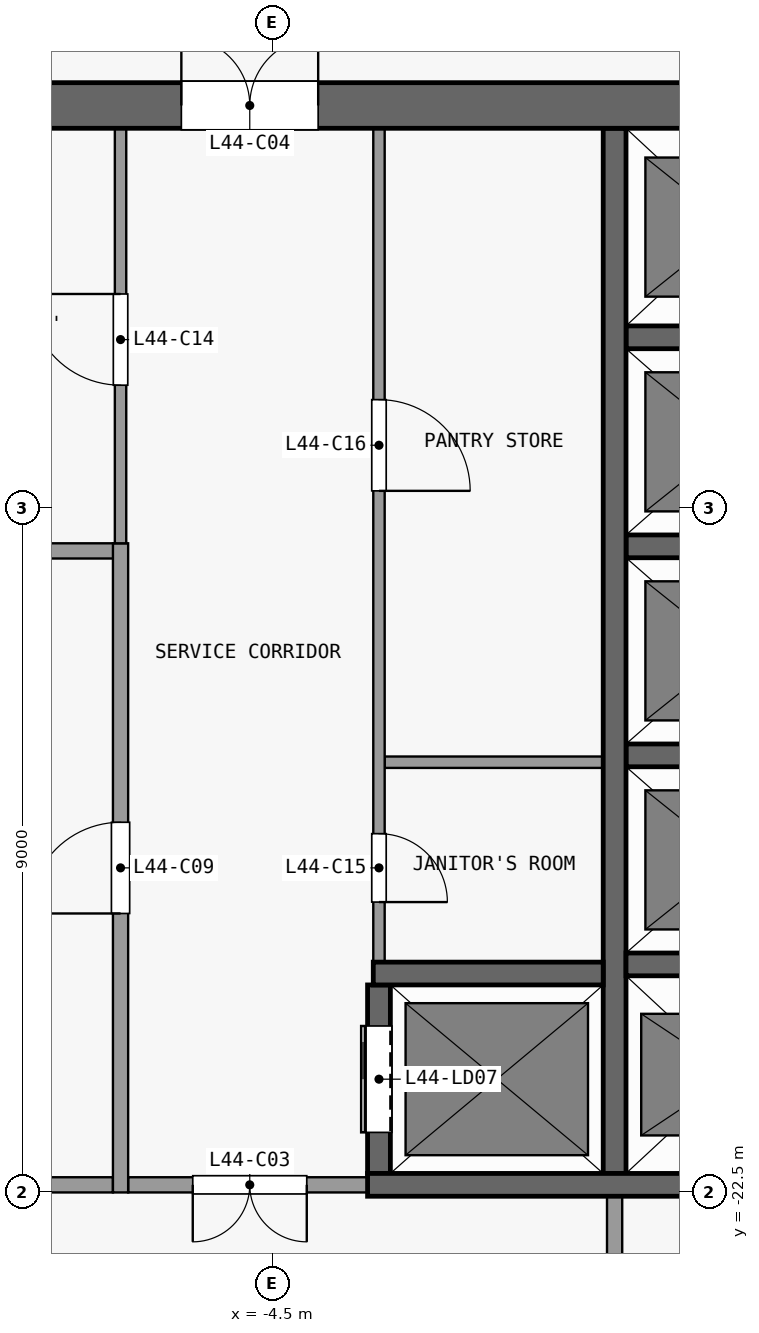
"""IFC4 building model, lengths in metres.
Left out: names, types, materials, properties, quantities, classifications, styles, units other than length and angle.
Written with IfcOpenShell. Run it as: python <this file> out.ifc"""

import sys

from ifc_helpers import new_model, si_unit, direction, frame, frame_2d, origin, place, context, subcontext, project, spatial, rectangle, extrude, element, fill, save


model = new_model("IFC4")
c1 = context("Model", 3, precision=1e-05, world=origin(), true_north=direction((0.0, 1.0)))
c2 = subcontext(c1, "Body", "Model", "MODEL_VIEW")
j1 = project(units=[si_unit("LENGTHUNIT", "METRE"), si_unit("PLANEANGLEUNIT", "RADIAN")], contexts=[c1])
p1 = place(None, origin())
s1 = spatial("IfcSite", under=j1, at=p1, CompositionType="ELEMENT")
p2 = place(p1, origin())
s2 = spatial("IfcBuilding", under=s1, at=p2, CompositionType="ELEMENT")
p3 = place(p2, frame((0.0, 0.0, 178.1)))
s3 = spatial("IfcBuildingStorey", under=s2, at=p3, CompositionType="ELEMENT", Elevation=178.1)
p4 = place(p3, frame((-13.3, -8.2, 0.0), z_axis=(0.0, 0.0, 1.0), x_axis=(1.0, 0.0, 0.0)))
e1 = element("IfcWall", 1, at=p4, inside=s3, PredefinedType="SHEAR", context=c2, shape_type="SweptSolid", body=[
    extrude(rectangle(XDim=26.6, YDim=0.6, at=frame_2d((13.3, 0.0))), origin(), (0.0, 0.0, 1.0), 3.3),
])
p5 = place(p4, frame((7.6, 0.0, 0.0)))
e2 = element("IfcOpeningElement", 2, at=p5, cuts=e1, PredefinedType="OPENING", context=c2, shape_type="SweptSolid", body=[
    extrude(rectangle(XDim=1.8, YDim=2.1, at=frame_2d((0.9, 1.05))), frame((0.0, 0.31, 0.0), z_axis=(0.0, -1.0, 0.0), x_axis=(1.0, 0.0, 0.0)), (0.0, 0.0, 1.0), 0.62),
])
p6 = place(p4, frame((17.2, 0.0, 0.0)))
e3 = element("IfcOpeningElement", 3, at=p6, cuts=e1, PredefinedType="OPENING", context=c2, shape_type="SweptSolid", body=[
    extrude(rectangle(XDim=1.8, YDim=2.1, at=frame_2d((0.9, 1.05))), frame((0.0, 0.31, 0.0), z_axis=(0.0, -1.0, 0.0), x_axis=(1.0, 0.0, 0.0)), (0.0, 0.0, 1.0), 0.62),
])
p7 = place(p4, frame((2.525, 0.0, 0.0)))
e4 = element("IfcOpeningElement", 4, at=p7, cuts=e1, PredefinedType="OPENING", context=c2, shape_type="SweptSolid", body=[
    extrude(rectangle(XDim=0.9, YDim=2.1, at=frame_2d((0.45, 1.05))), frame((0.0, 0.31, 0.0), z_axis=(0.0, -1.0, 0.0), x_axis=(1.0, 0.0, 0.0)), (0.0, 0.0, 1.0), 0.62),
])
p8 = place(p4, frame((23.175, 0.0, 0.0)))
e5 = element("IfcOpeningElement", 5, at=p8, cuts=e1, PredefinedType="OPENING", context=c2, shape_type="SweptSolid", body=[
    extrude(rectangle(XDim=0.9, YDim=2.1, at=frame_2d((0.45, 1.05))), frame((0.0, 0.31, 0.0), z_axis=(0.0, -1.0, 0.0), x_axis=(1.0, 0.0, 0.0)), (0.0, 0.0, 1.0), 0.62),
])
p9 = place(p3, frame((-9.45, -22.4, 0.0), z_axis=(0.0, 0.0, 1.0), x_axis=(1.0, 0.0, 0.0)))
e6 = element("IfcWall", 6, at=p9, inside=s3, PredefinedType="PARTITIONING", context=c2, shape_type="SweptSolid", body=[
    extrude(rectangle(XDim=2.85, YDim=0.2, at=frame_2d((1.425, 0.0))), origin(), (0.0, 0.0, 1.0), 3.3),
])
p10 = place(p3, frame((-3.25, -22.4, 0.0), z_axis=(0.0, 0.0, 1.0), x_axis=(-1.0, 0.0, 0.0)))
e7 = element("IfcWall", 7, at=p10, inside=s3, PredefinedType="PARTITIONING", context=c2, shape_type="SweptSolid", body=[
    extrude(rectangle(XDim=3.15, YDim=0.2, at=frame_2d((1.575, 0.0))), origin(), (0.0, 0.0, 1.0), 3.3),
])
p11 = place(p10, frame((0.8, 0.0, 0.0)))
e8 = element("IfcOpeningElement", 8, at=p11, cuts=e7, PredefinedType="OPENING", context=c2, shape_type="SweptSolid", body=[
    extrude(rectangle(XDim=1.5, YDim=2.1, at=frame_2d((0.75, 1.05))), frame((0.0, 0.11, 0.0), z_axis=(0.0, -1.0, 0.0), x_axis=(1.0, 0.0, 0.0)), (0.0, 0.0, 1.0), 0.22),
])
p12 = place(p3, frame((-3.25, -22.4, 0.0), z_axis=(0.0, 0.0, 1.0), x_axis=(1.0, 0.0, 0.0)))
e9 = element("IfcWall", 9, at=p12, inside=s3, PredefinedType="SHEAR", context=c2, shape_type="SweptSolid", body=[
    extrude(rectangle(XDim=6.2, YDim=0.3, at=frame_2d((3.1, 0.0))), origin(), (0.0, 0.0, 1.0), 3.3),
])
p13 = place(p3, frame((-3.175, -19.62, 0.0), z_axis=(0.0, 0.0, 1.0), x_axis=(1.0, 0.0, 0.0)))
e10 = element("IfcWall", 10, at=p13, inside=s3, PredefinedType="SHEAR", context=c2, shape_type="SweptSolid", body=[
    extrude(rectangle(XDim=3.025, YDim=0.3, at=frame_2d((1.513, 0.0))), origin(), (0.0, 0.0, 1.0), 3.3),
])
p14 = place(p3, frame((0.15, -19.5, 0.0), z_axis=(0.0, 0.0, 1.0), x_axis=(1.0, 0.0, 0.0)))
e11 = element("IfcWall", 11, at=p14, inside=s3, PredefinedType="SHEAR", context=c2, shape_type="SweptSolid", body=[
    extrude(rectangle(XDim=2.8, YDim=0.3, at=frame_2d((1.4, 0.0))), origin(), (0.0, 0.0, 1.0), 3.3),
])
p15 = place(p3, frame((-3.025, -16.84, 0.0), z_axis=(0.0, 0.0, 1.0), x_axis=(1.0, 0.0, 0.0)))
e12 = element("IfcWall", 12, at=p15, inside=s3, PredefinedType="PARTITIONING", context=c2, shape_type="SweptSolid", body=[
    extrude(rectangle(XDim=2.875, YDim=0.15, at=frame_2d((1.438, 0.0))), origin(), (0.0, 0.0, 1.0), 3.3),
])
p16 = place(p3, frame((0.15, -16.75, 0.0), z_axis=(0.0, 0.0, 1.0), x_axis=(1.0, 0.0, 0.0)))
e13 = element("IfcWall", 13, at=p16, inside=s3, PredefinedType="SHEAR", context=c2, shape_type="SweptSolid", body=[
    extrude(rectangle(XDim=2.8, YDim=0.3, at=frame_2d((1.4, 0.0))), origin(), (0.0, 0.0, 1.0), 3.3),
])
p17 = place(p3, frame((-9.5, -14.06, 0.0), z_axis=(0.0, 0.0, 1.0), x_axis=(1.0, 0.0, 0.0)))
e14 = element("IfcWall", 14, at=p17, inside=s3, PredefinedType="PARTITIONING", context=c2, shape_type="SweptSolid", body=[
    extrude(rectangle(XDim=3.075, YDim=0.2, at=frame_2d((1.538, 0.0))), origin(), (0.0, 0.0, 1.0), 3.3),
])
for number, where, z_axis, x_axis in (
    (15, (0.15, -14.0, 0.0), (0.0, 0.0, 1.0), (1.0, 0.0, 0.0)),
    (16, (0.15, -11.25, 0.0), (0.0, 0.0, 1.0), (1.0, 0.0, 0.0)),
):
    element("IfcWall", number, at=place(p3, frame(where, z_axis=z_axis, x_axis=x_axis)), inside=s3, PredefinedType="SHEAR", context=c2, shape_type="SweptSolid", body=[
        extrude(rectangle(XDim=2.8, YDim=0.3, at=frame_2d((1.4, 0.0))), origin(), (0.0, 0.0, 1.0), 3.3),
    ])
p18 = place(p3, frame((-6.5, -22.5, 0.0), z_axis=(0.0, 0.0, 1.0), x_axis=(0.0, 1.0, 0.0)))
e17 = element("IfcWall", 17, at=p18, inside=s3, PredefinedType="PARTITIONING", context=c2, shape_type="SweptSolid", body=[
    extrude(rectangle(XDim=8.54, YDim=0.2, at=frame_2d((4.27, 0.0))), origin(), (0.0, 0.0, 1.0), 3.3),
])
p19 = place(p18, frame((3.67, 0.0, 0.0)))
e18 = element("IfcOpeningElement", 18, at=p19, cuts=e17, PredefinedType="OPENING", context=c2, shape_type="SweptSolid", body=[
    extrude(rectangle(XDim=1.2, YDim=2.1, at=frame_2d((0.6, 1.05))), frame((0.0, 0.11, 0.0), z_axis=(0.0, -1.0, 0.0), x_axis=(1.0, 0.0, 0.0)), (0.0, 0.0, 1.0), 0.22),
])
p20 = place(p3, frame((-6.5, -13.96, 0.0), z_axis=(0.0, 0.0, 1.0), x_axis=(0.0, 1.0, 0.0)))
e19 = element("IfcWall", 19, at=p20, inside=s3, PredefinedType="PARTITIONING", context=c2, shape_type="SweptSolid", body=[
    extrude(rectangle(XDim=5.46, YDim=0.15, at=frame_2d((2.73, 0.0))), origin(), (0.0, 0.0, 1.0), 3.3),
])
p21 = place(p20, frame((2.08, 0.0, 0.0)))
e20 = element("IfcOpeningElement", 20, at=p21, cuts=e19, PredefinedType="OPENING", context=c2, shape_type="SweptSolid", body=[
    extrude(rectangle(XDim=1.2, YDim=2.1, at=frame_2d((0.6, 1.05))), frame((0.0, 0.085, 0.0), z_axis=(0.0, -1.0, 0.0), x_axis=(1.0, 0.0, 0.0)), (0.0, 0.0, 1.0), 0.17),
])
p22 = place(p3, frame((-3.1, -22.25, 0.0), z_axis=(0.0, 0.0, 1.0), x_axis=(0.0, 1.0, 0.0)))
e21 = element("IfcWall", 21, at=p22, inside=s3, PredefinedType="SHEAR", context=c2, shape_type="SweptSolid", body=[
    extrude(rectangle(XDim=2.48, YDim=0.3, at=frame_2d((1.24, 0.0))), origin(), (0.0, 0.0, 1.0), 3.3),
])
p23 = place(p22, frame((0.54, 0.0, 0.0)))
e22 = element("IfcOpeningElement", 22, at=p23, cuts=e21, PredefinedType="OPENING", context=c2, shape_type="SweptSolid", body=[
    extrude(rectangle(XDim=1.4, YDim=2.1, at=frame_2d((0.7, 1.05))), frame((0.0, 0.16, 0.0), z_axis=(0.0, -1.0, 0.0), x_axis=(1.0, 0.0, 0.0)), (0.0, 0.0, 1.0), 0.32),
])
p24 = place(p3, frame((-3.1, -8.5, 0.0), z_axis=(0.0, 0.0, 1.0), x_axis=(0.0, -1.0, 0.0)))
e23 = element("IfcWall", 23, at=p24, inside=s3, PredefinedType="PARTITIONING", context=c2, shape_type="SweptSolid", body=[
    extrude(rectangle(XDim=10.97, YDim=0.15, at=frame_2d((5.485, 0.0))), origin(), (0.0, 0.0, 1.0), 3.3),
])
p25 = place(p24, frame((9.28, 0.0, 0.0)))
e24 = element("IfcOpeningElement", 24, at=p25, cuts=e23, PredefinedType="OPENING", context=c2, shape_type="SweptSolid", body=[
    extrude(rectangle(XDim=0.9, YDim=2.1, at=frame_2d((0.45, 1.05))), frame((0.0, 0.085, 0.0), z_axis=(0.0, -1.0, 0.0), x_axis=(1.0, 0.0, 0.0)), (0.0, 0.0, 1.0), 0.17),
])
p26 = place(p24, frame((3.57, 0.0, 0.0)))
e25 = element("IfcOpeningElement", 25, at=p26, cuts=e23, PredefinedType="OPENING", context=c2, shape_type="SweptSolid", body=[
    extrude(rectangle(XDim=1.2, YDim=2.1, at=frame_2d((0.6, 1.05))), frame((0.0, 0.085, 0.0), z_axis=(0.0, -1.0, 0.0), x_axis=(1.0, 0.0, 0.0)), (0.0, 0.0, 1.0), 0.17),
])
p27 = place(p3, frame((0.0, -24.6, 0.0), z_axis=(0.0, 0.0, 1.0), x_axis=(0.0, 1.0, 0.0)))
e26 = element("IfcWall", 26, at=p27, inside=s3, PredefinedType="PARTITIONING", context=c2, shape_type="SweptSolid", body=[
    extrude(rectangle(XDim=2.05, YDim=0.2, at=frame_2d((1.025, 0.0))), origin(), (0.0, 0.0, 1.0), 3.3),
])
p28 = place(p3, frame((0.0, -22.25, 0.0), z_axis=(0.0, 0.0, 1.0), x_axis=(0.0, 1.0, 0.0)))
e27 = element("IfcWall", 27, at=p28, inside=s3, PredefinedType="SHEAR", context=c2, shape_type="SweptSolid", body=[
    extrude(rectangle(XDim=13.75, YDim=0.3, at=frame_2d((6.875, 0.0))), origin(), (0.0, 0.0, 1.0), 3.3),
])
p29 = place(p23, origin())
e28 = element("IfcDoor", 28, at=p29, inside=s3, OperationType="DOUBLE_DOOR_SLIDING", PredefinedType="DOOR", context=c2, shape_type="SweptSolid", body=[
    extrude(rectangle(XDim=1.4, YDim=2.1, at=frame_2d((0.7, 1.05))), frame((0.0, 0.025, 0.0), z_axis=(0.0, -1.0, 0.0), x_axis=(1.0, 0.0, 0.0)), (0.0, 0.0, 1.0), 0.05),
])
fill(e22, e28)
p30 = place(p11, origin())
e29 = element("IfcDoor", 29, at=p30, inside=s3, OperationType="DOUBLE_DOOR_SINGLE_SWING", PredefinedType="DOOR", context=c2, shape_type="SweptSolid", body=[
    extrude(rectangle(XDim=1.5, YDim=2.1, at=frame_2d((0.75, 1.05))), frame((0.0, 0.025, 0.0), z_axis=(0.0, -1.0, 0.0), x_axis=(1.0, 0.0, 0.0)), (0.0, 0.0, 1.0), 0.05),
])
fill(e8, e29)
p31 = place(p5, origin())
e30 = element("IfcDoor", 30, at=p31, inside=s3, OperationType="DOUBLE_DOOR_SINGLE_SWING", PredefinedType="DOOR", context=c2, shape_type="SweptSolid", body=[
    extrude(rectangle(XDim=1.8, YDim=2.1, at=frame_2d((0.9, 1.05))), frame((0.0, 0.025, 0.0), z_axis=(0.0, -1.0, 0.0), x_axis=(1.0, 0.0, 0.0)), (0.0, 0.0, 1.0), 0.05),
])
fill(e2, e30)
p32 = place(p19, origin())
e31 = element("IfcDoor", 31, at=p32, inside=s3, OperationType="SINGLE_SWING_LEFT", PredefinedType="DOOR", context=c2, shape_type="SweptSolid", body=[
    extrude(rectangle(XDim=1.2, YDim=2.1, at=frame_2d((0.6, 1.05))), frame((0.0, 0.025, 0.0), z_axis=(0.0, -1.0, 0.0), x_axis=(1.0, 0.0, 0.0)), (0.0, 0.0, 1.0), 0.05),
])
fill(e18, e31)
p33 = place(p21, origin())
e32 = element("IfcDoor", 32, at=p33, inside=s3, OperationType="SINGLE_SWING_RIGHT", PredefinedType="DOOR", context=c2, shape_type="SweptSolid", body=[
    extrude(rectangle(XDim=1.2, YDim=2.1, at=frame_2d((0.6, 1.05))), frame((0.0, 0.025, 0.0), z_axis=(0.0, -1.0, 0.0), x_axis=(1.0, 0.0, 0.0)), (0.0, 0.0, 1.0), 0.05),
])
fill(e20, e32)
p34 = place(p25, origin())
e33 = element("IfcDoor", 33, at=p34, inside=s3, OperationType="SINGLE_SWING_RIGHT", PredefinedType="DOOR", context=c2, shape_type="SweptSolid", body=[
    extrude(rectangle(XDim=0.9, YDim=2.1, at=frame_2d((0.45, 1.05))), frame((0.0, 0.025, 0.0), z_axis=(0.0, -1.0, 0.0), x_axis=(1.0, 0.0, 0.0)), (0.0, 0.0, 1.0), 0.05),
])
fill(e24, e33)
p35 = place(p26, origin())
e34 = element("IfcDoor", 34, at=p35, inside=s3, OperationType="SINGLE_SWING_RIGHT", PredefinedType="DOOR", context=c2, shape_type="SweptSolid", body=[
    extrude(rectangle(XDim=1.2, YDim=2.1, at=frame_2d((0.6, 1.05))), frame((0.0, 0.025, 0.0), z_axis=(0.0, -1.0, 0.0), x_axis=(1.0, 0.0, 0.0)), (0.0, 0.0, 1.0), 0.05),
])
fill(e25, e34)
save(model, sys.argv[1])
